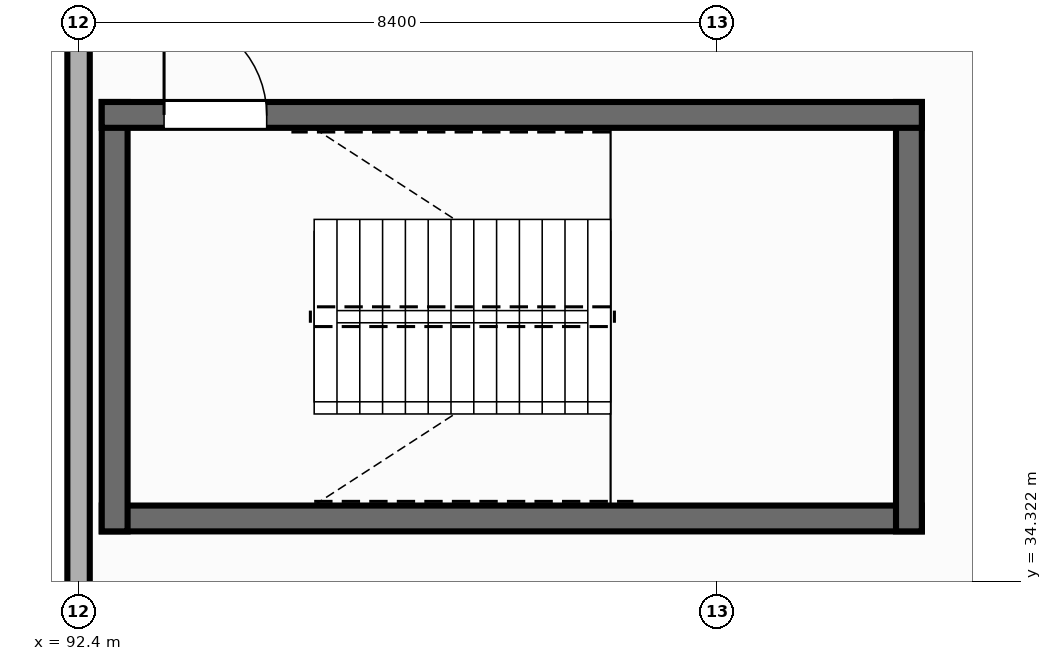
"""IFC4 building model, lengths in metres.
Left out: names, types, materials, properties, quantities, classifications, styles, units other than length and angle.
Written with IfcOpenShell. Run it as: python <this file> out.ifc"""

import sys

from ifc_helpers import new_model, si_unit, direction, frame, frame_2d, origin, place, context, subcontext, project, spatial, rectangle, extrude, element, fill, save


model = new_model("IFC4")
c1 = context("Model", 3, precision=1e-05, world=origin(), true_north=direction((0.0, 1.0)))
c2 = subcontext(c1, "Body", "Model", "MODEL_VIEW")
j1 = project(units=[si_unit("LENGTHUNIT", "METRE"), si_unit("PLANEANGLEUNIT", "RADIAN")], contexts=[c1])
p1 = place(None, origin())
s1 = spatial("IfcSite", under=j1, at=p1, CompositionType="ELEMENT")
p2 = place(p1, origin())
s2 = spatial("IfcBuilding", under=s1, at=p2, CompositionType="ELEMENT")
p3 = place(p2, frame((0.0, 0.0, 5.4)))
s3 = spatial("IfcBuildingStorey", under=s2, at=p3, CompositionType="ELEMENT", Elevation=5.4)
p4 = place(p3, frame((92.4, 41.679, 0.0), z_axis=(0.0, 0.0, 1.0), x_axis=(0.0, -1.0, 0.0)))
e1 = element("IfcWall", 1, at=p4, inside=s3, PredefinedType="STANDARD", context=c2, shape_type="SweptSolid", body=[
    extrude(rectangle(XDim=7.758, YDim=0.295, at=frame_2d((3.879, 0.0))), origin(), (0.0, 0.0, 1.0), 4.012),
])
p5 = place(p3, frame((92.705, 35.145, 0.0), z_axis=(0.0, 0.0, 1.0), x_axis=(1.0, 0.0, 0.0)))
e2 = element("IfcWall", 2, at=p5, inside=s3, PredefinedType="SHEAR", context=c2, shape_type="SweptSolid", body=[
    extrude(rectangle(XDim=10.79, YDim=0.34, at=frame_2d((5.395, 0.0))), origin(), (0.0, 0.0, 1.0), 4.29),
])
for number, where, z_axis, x_axis in (
    (3, (92.875, 34.975, 0.0), (0.0, 0.0, 1.0), (0.0, 1.0, 0.0)),
    (4, (103.325, 34.975, 0.0), (0.0, 0.0, 1.0), (0.0, 1.0, 0.0)),
):
    element("IfcWall", number, at=place(p3, frame(where, z_axis=z_axis, x_axis=x_axis)), inside=s3, PredefinedType="SHEAR", context=c2, shape_type="SweptSolid", body=[
        extrude(rectangle(XDim=5.65, YDim=0.34, at=frame_2d((2.825, 0.0))), origin(), (0.0, 0.0, 1.0), 4.29),
    ])
p6 = place(p3, frame((92.705, 40.455, 0.0), z_axis=(0.0, 0.0, 1.0), x_axis=(1.0, 0.0, 0.0)))
e5 = element("IfcWall", 5, at=p6, inside=s3, PredefinedType="SHEAR", context=c2, shape_type="SweptSolid", body=[
    extrude(rectangle(XDim=10.79, YDim=0.34, at=frame_2d((5.395, 0.0))), origin(), (0.0, 0.0, 1.0), 4.29),
])
p7 = place(p6, frame((0.82, 0.0, 0.0)))
e6 = element("IfcOpeningElement", 6, at=p7, cuts=e5, PredefinedType="OPENING", context=c2, shape_type="SweptSolid", body=[
    extrude(rectangle(XDim=1.35, YDim=2.2, at=frame_2d((0.675, 1.1))), frame((0.0, 0.18, 0.0), z_axis=(0.0, -1.0, 0.0), x_axis=(1.0, 0.0, 0.0)), (0.0, 0.0, 1.0), 0.36),
])
p8 = place(p7, origin())
e7 = element("IfcDoor", 7, at=p8, inside=s3, OperationType="SINGLE_SWING_LEFT", PredefinedType="DOOR", context=c2, shape_type="SweptSolid", body=[
    extrude(rectangle(XDim=1.35, YDim=2.2, at=frame_2d((0.675, 1.1))), frame((0.0, 0.025, 0.0), z_axis=(0.0, -1.0, 0.0), x_axis=(1.0, 0.0, 0.0)), (0.0, 0.0, 1.0), 0.05),
])
fill(e6, e7)
save(model, sys.argv[1])
